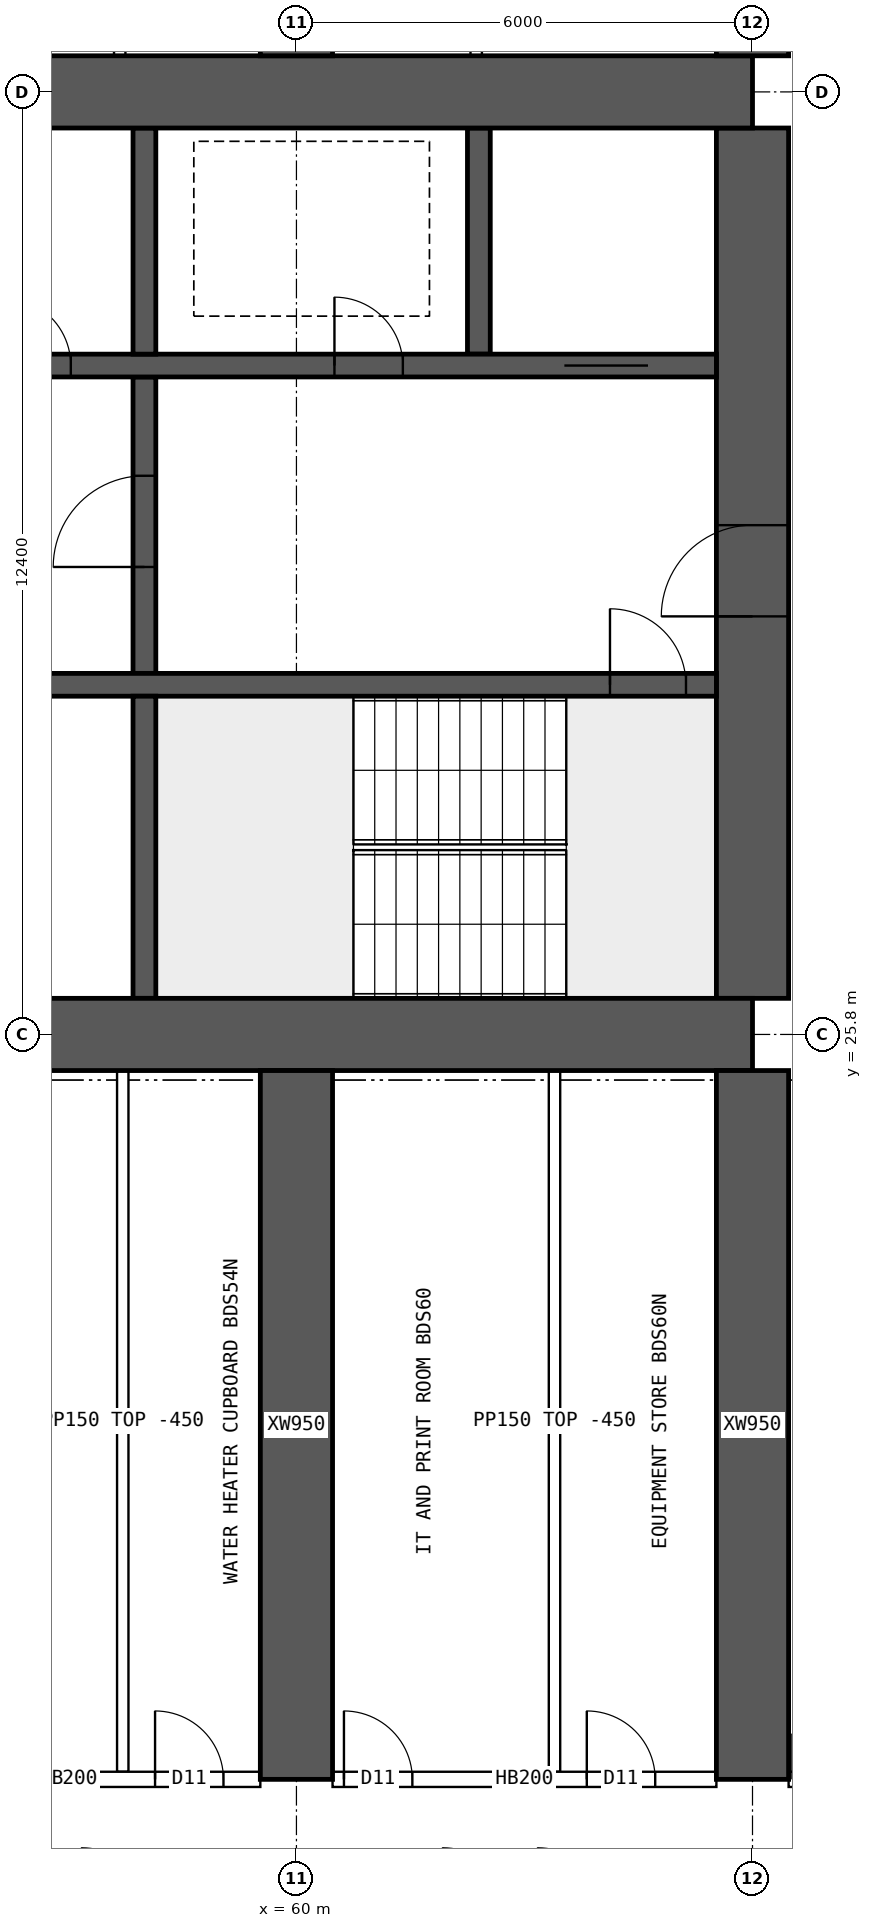
"""IFC4 building model, lengths in metres.
Left out: names, types, materials, properties, quantities, classifications, styles, units other than length and angle.
Written with IfcOpenShell. Run it as: python <this file> out.ifc"""

import sys

from ifc_helpers import new_model, si_unit, direction, frame, frame_2d, origin, place, context, subcontext, project, spatial, rectangle, extrude, element, fill, save


model = new_model("IFC4")
c1 = context("Model", 3, precision=1e-05, world=origin(), true_north=direction((0.0, 1.0)))
c2 = subcontext(c1, "Body", "Model", "MODEL_VIEW")
j1 = project(units=[si_unit("LENGTHUNIT", "METRE"), si_unit("PLANEANGLEUNIT", "RADIAN")], contexts=[c1])
p1 = place(None, origin())
s1 = spatial("IfcSite", under=j1, at=p1, CompositionType="ELEMENT")
p2 = place(p1, origin())
s2 = spatial("IfcBuilding", under=s1, at=p2, CompositionType="ELEMENT")
p3 = place(p2, frame((0.0, 0.0, 80.65)))
s3 = spatial("IfcBuildingStorey", under=s2, at=p3, CompositionType="ELEMENT", Elevation=80.65)
for number, where, z_axis, x_axis in (
    (1, (18.0, 25.8, 0.0), (0.0, 0.0, 1.0), (1.0, 0.0, 0.0)),
    (2, (18.0, 38.2, 0.0), (0.0, 0.0, 1.0), (1.0, 0.0, 0.0)),
):
    element("IfcWall", number, at=place(p3, frame(where, z_axis=z_axis, x_axis=x_axis)), inside=s3, PredefinedType="SHEAR", context=c2, shape_type="SweptSolid", body=[
        extrude(rectangle(XDim=48.0, YDim=0.95, at=frame_2d((24.0, 0.0))), origin(), (0.0, 0.0, 1.0), 3.75),
    ])
p4 = place(p3, frame((66.0, 26.275, 0.0), z_axis=(0.0, 0.0, 1.0), x_axis=(0.0, 1.0, 0.0)))
e3 = element("IfcWall", 3, at=p4, inside=s3, PredefinedType="SHEAR", context=c2, shape_type="SweptSolid", body=[
    extrude(rectangle(XDim=11.45, YDim=0.95, at=frame_2d((5.725, 0.0))), origin(), (0.0, 0.0, 1.0), 3.75),
])
p5 = place(p4, frame((5.025, 0.0, 0.0)))
e4 = element("IfcOpeningElement", 4, at=p5, cuts=e3, PredefinedType="OPENING", context=c2, shape_type="SweptSolid", body=[
    extrude(rectangle(XDim=1.2, YDim=2.1, at=frame_2d((0.6, 1.05))), frame((0.0, 0.485, 0.0), z_axis=(0.0, -1.0, 0.0), x_axis=(1.0, 0.0, 0.0)), (0.0, 0.0, 1.0), 0.97),
])
p6 = place(p3, frame((18.475, 30.4, 0.0), z_axis=(0.0, 0.0, 1.0), x_axis=(1.0, 0.0, 0.0)))
e5 = element("IfcWall", 5, at=p6, inside=s3, PredefinedType="SHEAR", context=c2, shape_type="SweptSolid", body=[
    extrude(rectangle(XDim=47.05, YDim=0.3, at=frame_2d((23.525, 0.0))), origin(), (0.0, 0.0, 1.0), 3.75),
])
p7 = place(p6, frame((0.4, 0.0, 0.0)))
e6 = element("IfcOpeningElement", 6, at=p7, cuts=e5, PredefinedType="OPENING", context=c2, shape_type="SweptSolid", body=[
    extrude(rectangle(XDim=1.0, YDim=2.1, at=frame_2d((0.5, 1.05))), frame((0.0, 0.16, 0.0), z_axis=(0.0, -1.0, 0.0), x_axis=(1.0, 0.0, 0.0)), (0.0, 0.0, 1.0), 0.32),
])
p8 = place(p6, frame((45.65, 0.0, 0.0)))
e7 = element("IfcOpeningElement", 7, at=p8, cuts=e5, PredefinedType="OPENING", context=c2, shape_type="SweptSolid", body=[
    extrude(rectangle(XDim=1.0, YDim=2.1, at=frame_2d((0.5, 1.05))), frame((0.0, 0.16, 0.0), z_axis=(0.0, -1.0, 0.0), x_axis=(1.0, 0.0, 0.0)), (0.0, 0.0, 1.0), 0.32),
])
p9 = place(p6, frame((8.275, 0.0, 0.0)))
e8 = element("IfcOpeningElement", 8, at=p9, cuts=e5, PredefinedType="OPENING", context=c2, shape_type="SweptSolid", body=[
    extrude(rectangle(XDim=1.1, YDim=2.1, at=frame_2d((0.55, 1.05))), frame((0.0, 0.16, 0.0), z_axis=(0.0, -1.0, 0.0), x_axis=(1.0, 0.0, 0.0)), (0.0, 0.0, 1.0), 0.32),
])
p10 = place(p6, frame((10.875, 0.0, 0.0)))
e9 = element("IfcOpeningElement", 9, at=p10, cuts=e5, PredefinedType="OPENING", context=c2, shape_type="SweptSolid", body=[
    extrude(rectangle(XDim=1.1, YDim=2.1, at=frame_2d((0.55, 1.05))), frame((0.0, 0.16, 0.0), z_axis=(0.0, -1.0, 0.0), x_axis=(1.0, 0.0, 0.0)), (0.0, 0.0, 1.0), 0.32),
])
p11 = place(p6, frame((13.475, 0.0, 0.0)))
e10 = element("IfcOpeningElement", 10, at=p11, cuts=e5, PredefinedType="OPENING", context=c2, shape_type="SweptSolid", body=[
    extrude(rectangle(XDim=1.1, YDim=2.1, at=frame_2d((0.55, 1.05))), frame((0.0, 0.16, 0.0), z_axis=(0.0, -1.0, 0.0), x_axis=(1.0, 0.0, 0.0)), (0.0, 0.0, 1.0), 0.32),
])
p12 = place(p6, frame((16.075, 0.0, 0.0)))
e11 = element("IfcOpeningElement", 11, at=p12, cuts=e5, PredefinedType="OPENING", context=c2, shape_type="SweptSolid", body=[
    extrude(rectangle(XDim=1.1, YDim=2.1, at=frame_2d((0.55, 1.05))), frame((0.0, 0.16, 0.0), z_axis=(0.0, -1.0, 0.0), x_axis=(1.0, 0.0, 0.0)), (0.0, 0.0, 1.0), 0.32),
])
p13 = place(p6, frame((30.142, 0.0, 0.0)))
e12 = element("IfcOpeningElement", 12, at=p13, cuts=e5, PredefinedType="OPENING", context=c2, shape_type="SweptSolid", body=[
    extrude(rectangle(XDim=1.1, YDim=2.1, at=frame_2d((0.55, 1.05))), frame((0.0, 0.16, 0.0), z_axis=(0.0, -1.0, 0.0), x_axis=(1.0, 0.0, 0.0)), (0.0, 0.0, 1.0), 0.32),
])
p14 = place(p6, frame((33.675, 0.0, 0.0)))
e13 = element("IfcOpeningElement", 13, at=p14, cuts=e5, PredefinedType="OPENING", context=c2, shape_type="SweptSolid", body=[
    extrude(rectangle(XDim=1.1, YDim=2.1, at=frame_2d((0.55, 1.05))), frame((0.0, 0.16, 0.0), z_axis=(0.0, -1.0, 0.0), x_axis=(1.0, 0.0, 0.0)), (0.0, 0.0, 1.0), 0.32),
])
p15 = place(p6, frame((37.208, 0.0, 0.0)))
e14 = element("IfcOpeningElement", 14, at=p15, cuts=e5, PredefinedType="OPENING", context=c2, shape_type="SweptSolid", body=[
    extrude(rectangle(XDim=1.1, YDim=2.1, at=frame_2d((0.55, 1.05))), frame((0.0, 0.16, 0.0), z_axis=(0.0, -1.0, 0.0), x_axis=(1.0, 0.0, 0.0)), (0.0, 0.0, 1.0), 0.32),
])
p16 = place(p3, frame((18.475, 34.6, 0.0), z_axis=(0.0, 0.0, 1.0), x_axis=(1.0, 0.0, 0.0)))
e15 = element("IfcWall", 15, at=p16, inside=s3, PredefinedType="SHEAR", context=c2, shape_type="SweptSolid", body=[
    extrude(rectangle(XDim=47.05, YDim=0.3, at=frame_2d((23.525, 0.0))), origin(), (0.0, 0.0, 1.0), 3.75),
])
p17 = place(p16, frame((0.9, 0.0, 0.0)))
e16 = element("IfcOpeningElement", 16, at=p17, cuts=e15, PredefinedType="OPENING", context=c2, shape_type="SweptSolid", body=[
    extrude(rectangle(XDim=1.1, YDim=2.1, at=frame_2d((0.55, 1.05))), frame((0.0, 0.16, 0.0), z_axis=(0.0, -1.0, 0.0), x_axis=(1.0, 0.0, 0.0)), (0.0, 0.0, 1.0), 0.32),
])
p18 = place(p16, frame((45.05, 0.0, 0.0)))
e17 = element("IfcOpeningElement", 17, at=p18, cuts=e15, PredefinedType="OPENING", context=c2, shape_type="SweptSolid", body=[
    extrude(rectangle(XDim=1.1, YDim=2.1, at=frame_2d((0.55, 1.05))), frame((0.0, 0.16, 0.0), z_axis=(0.0, -1.0, 0.0), x_axis=(1.0, 0.0, 0.0)), (0.0, 0.0, 1.0), 0.32),
])
p19 = place(p16, frame((4.125, 0.0, 0.0)))
e18 = element("IfcOpeningElement", 18, at=p19, cuts=e15, PredefinedType="OPENING", context=c2, shape_type="SweptSolid", body=[
    extrude(rectangle(XDim=0.9, YDim=2.1, at=frame_2d((0.45, 1.05))), frame((0.0, 0.16, 0.0), z_axis=(0.0, -1.0, 0.0), x_axis=(1.0, 0.0, 0.0)), (0.0, 0.0, 1.0), 0.32),
])
p20 = place(p16, frame((42.025, 0.0, 0.0)))
e19 = element("IfcOpeningElement", 19, at=p20, cuts=e15, PredefinedType="OPENING", context=c2, shape_type="SweptSolid", body=[
    extrude(rectangle(XDim=0.9, YDim=2.1, at=frame_2d((0.45, 1.05))), frame((0.0, 0.16, 0.0), z_axis=(0.0, -1.0, 0.0), x_axis=(1.0, 0.0, 0.0)), (0.0, 0.0, 1.0), 0.32),
])
p21 = place(p16, frame((8.9, 0.0, 0.0)))
e20 = element("IfcOpeningElement", 20, at=p21, cuts=e15, PredefinedType="OPENING", context=c2, shape_type="SweptSolid", body=[
    extrude(rectangle(XDim=0.9, YDim=2.1, at=frame_2d((0.45, 1.05))), frame((0.0, 0.16, 0.0), z_axis=(0.0, -1.0, 0.0), x_axis=(1.0, 0.0, 0.0)), (0.0, 0.0, 1.0), 0.32),
])
p22 = place(p16, frame((12.874, 0.0, 0.0)))
e21 = element("IfcOpeningElement", 21, at=p22, cuts=e15, PredefinedType="OPENING", context=c2, shape_type="SweptSolid", body=[
    extrude(rectangle(XDim=0.9, YDim=2.1, at=frame_2d((0.45, 1.05))), frame((0.0, 0.16, 0.0), z_axis=(0.0, -1.0, 0.0), x_axis=(1.0, 0.0, 0.0)), (0.0, 0.0, 1.0), 0.32),
])
p23 = place(p16, frame((16.521, 0.0, 0.0)))
e22 = element("IfcOpeningElement", 22, at=p23, cuts=e15, PredefinedType="OPENING", context=c2, shape_type="SweptSolid", body=[
    extrude(rectangle(XDim=0.9, YDim=2.1, at=frame_2d((0.45, 1.05))), frame((0.0, 0.16, 0.0), z_axis=(0.0, -1.0, 0.0), x_axis=(1.0, 0.0, 0.0)), (0.0, 0.0, 1.0), 0.32),
])
p24 = place(p16, frame((20.28, 0.0, 0.0)))
e23 = element("IfcOpeningElement", 23, at=p24, cuts=e15, PredefinedType="OPENING", context=c2, shape_type="SweptSolid", body=[
    extrude(rectangle(XDim=0.9, YDim=2.1, at=frame_2d((0.45, 1.05))), frame((0.0, 0.16, 0.0), z_axis=(0.0, -1.0, 0.0), x_axis=(1.0, 0.0, 0.0)), (0.0, 0.0, 1.0), 0.32),
])
p25 = place(p16, frame((24.686, 0.0, 0.0)))
e24 = element("IfcOpeningElement", 24, at=p25, cuts=e15, PredefinedType="OPENING", context=c2, shape_type="SweptSolid", body=[
    extrude(rectangle(XDim=0.9, YDim=2.1, at=frame_2d((0.45, 1.05))), frame((0.0, 0.16, 0.0), z_axis=(0.0, -1.0, 0.0), x_axis=(1.0, 0.0, 0.0)), (0.0, 0.0, 1.0), 0.32),
])
p26 = place(p16, frame((27.483, 0.0, 0.0)))
e25 = element("IfcOpeningElement", 25, at=p26, cuts=e15, PredefinedType="OPENING", context=c2, shape_type="SweptSolid", body=[
    extrude(rectangle(XDim=0.9, YDim=2.1, at=frame_2d((0.45, 1.05))), frame((0.0, 0.16, 0.0), z_axis=(0.0, -1.0, 0.0), x_axis=(1.0, 0.0, 0.0)), (0.0, 0.0, 1.0), 0.32),
])
p27 = place(p16, frame((29.45, 0.0, 0.0)))
e26 = element("IfcOpeningElement", 26, at=p27, cuts=e15, PredefinedType="OPENING", context=c2, shape_type="SweptSolid", body=[
    extrude(rectangle(XDim=0.9, YDim=2.1, at=frame_2d((0.45, 1.05))), frame((0.0, 0.16, 0.0), z_axis=(0.0, -1.0, 0.0), x_axis=(1.0, 0.0, 0.0)), (0.0, 0.0, 1.0), 0.32),
])
p28 = place(p16, frame((31.882, 0.0, 0.0)))
e27 = element("IfcOpeningElement", 27, at=p28, cuts=e15, PredefinedType="OPENING", context=c2, shape_type="SweptSolid", body=[
    extrude(rectangle(XDim=0.9, YDim=2.1, at=frame_2d((0.45, 1.05))), frame((0.0, 0.16, 0.0), z_axis=(0.0, -1.0, 0.0), x_axis=(1.0, 0.0, 0.0)), (0.0, 0.0, 1.0), 0.32),
])
p29 = place(p16, frame((34.617, 0.0, 0.0)))
e28 = element("IfcOpeningElement", 28, at=p29, cuts=e15, PredefinedType="OPENING", context=c2, shape_type="SweptSolid", body=[
    extrude(rectangle(XDim=0.9, YDim=2.1, at=frame_2d((0.45, 1.05))), frame((0.0, 0.16, 0.0), z_axis=(0.0, -1.0, 0.0), x_axis=(1.0, 0.0, 0.0)), (0.0, 0.0, 1.0), 0.32),
])
p30 = place(p16, frame((37.656, 0.0, 0.0)))
e29 = element("IfcOpeningElement", 29, at=p30, cuts=e15, PredefinedType="OPENING", context=c2, shape_type="SweptSolid", body=[
    extrude(rectangle(XDim=0.9, YDim=2.1, at=frame_2d((0.45, 1.05))), frame((0.0, 0.16, 0.0), z_axis=(0.0, -1.0, 0.0), x_axis=(1.0, 0.0, 0.0)), (0.0, 0.0, 1.0), 0.32),
])
p31 = place(p3, frame((58.0, 26.275, 0.0), z_axis=(0.0, 0.0, 1.0), x_axis=(0.0, 1.0, 0.0)))
e30 = element("IfcWall", 30, at=p31, inside=s3, PredefinedType="SHEAR", context=c2, shape_type="SweptSolid", body=[
    extrude(rectangle(XDim=3.975, YDim=0.3, at=frame_2d((1.988, 0.0))), origin(), (0.0, 0.0, 1.0), 3.75),
])
p32 = place(p3, frame((58.0, 30.55, 0.0), z_axis=(0.0, 0.0, 1.0), x_axis=(0.0, 1.0, 0.0)))
e31 = element("IfcWall", 31, at=p32, inside=s3, PredefinedType="SHEAR", context=c2, shape_type="SweptSolid", body=[
    extrude(rectangle(XDim=3.9, YDim=0.3, at=frame_2d((1.95, 0.0))), origin(), (0.0, 0.0, 1.0), 3.75),
])
p33 = place(p32, frame((1.4, 0.0, 0.0)))
e32 = element("IfcOpeningElement", 32, at=p33, cuts=e31, PredefinedType="OPENING", context=c2, shape_type="SweptSolid", body=[
    extrude(rectangle(XDim=1.2, YDim=2.1, at=frame_2d((0.6, 1.05))), frame((0.0, 0.16, 0.0), z_axis=(0.0, -1.0, 0.0), x_axis=(1.0, 0.0, 0.0)), (0.0, 0.0, 1.0), 0.32),
])
for number, where, z_axis, x_axis in (
    (33, (62.4, 34.75, 0.0), (0.0, 0.0, 1.0), (0.0, 1.0, 0.0)),
    (34, (58.0, 34.75, 0.0), (0.0, 0.0, 1.0), (0.0, 1.0, 0.0)),
):
    element("IfcWall", number, at=place(p3, frame(where, z_axis=z_axis, x_axis=x_axis)), inside=s3, PredefinedType="SHEAR", context=c2, shape_type="SweptSolid", body=[
        extrude(rectangle(XDim=2.975, YDim=0.3, at=frame_2d((1.488, 0.0))), origin(), (0.0, 0.0, 1.0), 3.75),
    ])
for number, where, z_axis, x_axis in (
    (35, (60.0, 16.0, 0.0), (0.0, 0.0, 1.0), (0.0, 1.0, 0.0)),
    (36, (60.0, 38.675, 0.0), (0.0, 0.0, 1.0), (0.0, 1.0, 0.0)),
    (37, (66.0, 16.0, 0.0), (0.0, 0.0, 1.0), (0.0, 1.0, 0.0)),
    (38, (66.0, 38.675, 0.0), (0.0, 0.0, 1.0), (0.0, 1.0, 0.0)),
):
    element("IfcWall", number, at=place(p3, frame(where, z_axis=z_axis, x_axis=x_axis)), inside=s3, PredefinedType="SHEAR", context=c2, shape_type="SweptSolid", body=[
        extrude(rectangle(XDim=9.325, YDim=0.95, at=frame_2d((4.663, 0.0))), origin(), (0.0, 0.0, 1.0), 3.75),
    ])
p34 = place(p3, frame((54.475, 16.0, 0.0), z_axis=(0.0, 0.0, 1.0), x_axis=(1.0, 0.0, 0.0)))
e39 = element("IfcWall", 39, at=p34, inside=s3, PredefinedType="SOLIDWALL", context=c2, shape_type="SweptSolid", body=[
    extrude(rectangle(XDim=5.05, YDim=0.2, at=frame_2d((2.525, 0.0))), origin(), (0.0, 0.0, 1.0), 3.3),
])
p35 = place(p34, frame((0.35, 0.0, 0.0)))
e40 = element("IfcOpeningElement", 40, at=p35, cuts=e39, PredefinedType="OPENING", context=c2, shape_type="SweptSolid", body=[
    extrude(rectangle(XDim=0.9, YDim=2.1, at=frame_2d((0.45, 1.05))), frame((0.0, 0.11, 0.0), z_axis=(0.0, -1.0, 0.0), x_axis=(1.0, 0.0, 0.0)), (0.0, 0.0, 1.0), 0.22),
])
p36 = place(p34, frame((3.665, 0.0, 0.0)))
e41 = element("IfcOpeningElement", 41, at=p36, cuts=e39, PredefinedType="OPENING", context=c2, shape_type="SweptSolid", body=[
    extrude(rectangle(XDim=0.9, YDim=2.1, at=frame_2d((0.45, 1.05))), frame((0.0, 0.11, 0.0), z_axis=(0.0, -1.0, 0.0), x_axis=(1.0, 0.0, 0.0)), (0.0, 0.0, 1.0), 0.22),
])
p37 = place(p3, frame((60.475, 16.0, 0.0), z_axis=(0.0, 0.0, 1.0), x_axis=(1.0, 0.0, 0.0)))
e42 = element("IfcWall", 42, at=p37, inside=s3, PredefinedType="SOLIDWALL", context=c2, shape_type="SweptSolid", body=[
    extrude(rectangle(XDim=5.05, YDim=0.2, at=frame_2d((2.525, 0.0))), origin(), (0.0, 0.0, 1.0), 3.3),
])
p38 = place(p37, frame((0.15, 0.0, 0.0)))
e43 = element("IfcOpeningElement", 43, at=p38, cuts=e42, PredefinedType="OPENING", context=c2, shape_type="SweptSolid", body=[
    extrude(rectangle(XDim=0.9, YDim=2.1, at=frame_2d((0.45, 1.05))), frame((0.0, 0.11, 0.0), z_axis=(0.0, -1.0, 0.0), x_axis=(1.0, 0.0, 0.0)), (0.0, 0.0, 1.0), 0.22),
])
p39 = place(p37, frame((3.345, 0.0, 0.0)))
e44 = element("IfcOpeningElement", 44, at=p39, cuts=e42, PredefinedType="OPENING", context=c2, shape_type="SweptSolid", body=[
    extrude(rectangle(XDim=0.9, YDim=2.1, at=frame_2d((0.45, 1.05))), frame((0.0, 0.11, 0.0), z_axis=(0.0, -1.0, 0.0), x_axis=(1.0, 0.0, 0.0)), (0.0, 0.0, 1.0), 0.22),
])
p40 = place(p3, frame((66.475, 16.0, 0.0), z_axis=(0.0, 0.0, 1.0), x_axis=(1.0, 0.0, 0.0)))
e45 = element("IfcWall", 45, at=p40, inside=s3, PredefinedType="SOLIDWALL", context=c2, shape_type="SweptSolid", body=[
    extrude(rectangle(XDim=1.925, YDim=0.2, at=frame_2d((0.962, 0.0))), origin(), (0.0, 0.0, 1.0), 3.3),
])
p41 = place(p40, frame((0.05, 0.0, 0.0)))
e46 = element("IfcOpeningElement", 46, at=p41, cuts=e45, PredefinedType="OPENING", context=c2, shape_type="SweptSolid", body=[
    extrude(rectangle(XDim=1.2, YDim=2.1, at=frame_2d((0.6, 1.05))), frame((0.0, 0.11, 0.0), z_axis=(0.0, -1.0, 0.0), x_axis=(1.0, 0.0, 0.0)), (0.0, 0.0, 1.0), 0.22),
])
for number, where, z_axis, x_axis in (
    (47, (57.715, 16.1, 0.0), (0.0, 0.0, 1.0), (0.0, 1.0, 0.0)),
    (48, (63.395, 16.1, 0.0), (0.0, 0.0, 1.0), (0.0, 1.0, 0.0)),
    (49, (57.675, 38.675, 0.0), (0.0, 0.0, 1.0), (0.0, 1.0, 0.0)),
    (50, (62.365, 38.675, 0.0), (0.0, 0.0, 1.0), (0.0, 1.0, 0.0)),
):
    element("IfcWall", number, at=place(p3, frame(where, z_axis=z_axis, x_axis=x_axis)), inside=s3, PredefinedType="PARTITIONING", context=c2, shape_type="SweptSolid", body=[
        extrude(rectangle(XDim=9.225, YDim=0.15, at=frame_2d((4.612, 0.0))), origin(), (0.0, 0.0, 1.0), 3.3),
    ])
p42 = place(p5, origin())
e51 = element("IfcDoor", 51, at=p42, inside=s3, OperationType="SINGLE_SWING_LEFT", PredefinedType="DOOR", context=c2, shape_type="SweptSolid", body=[
    extrude(rectangle(XDim=1.2, YDim=2.1, at=frame_2d((0.6, 1.05))), frame((0.0, 0.025, 0.0), z_axis=(0.0, -1.0, 0.0), x_axis=(1.0, 0.0, 0.0)), (0.0, 0.0, 1.0), 0.05),
])
fill(e4, e51)
p43 = place(p8, origin())
e52 = element("IfcDoor", 52, at=p43, inside=s3, OperationType="SINGLE_SWING_LEFT", PredefinedType="DOOR", context=c2, shape_type="SweptSolid", body=[
    extrude(rectangle(XDim=1.0, YDim=2.1, at=frame_2d((0.5, 1.05))), frame((0.0, 0.025, 0.0), z_axis=(0.0, -1.0, 0.0), x_axis=(1.0, 0.0, 0.0)), (0.0, 0.0, 1.0), 0.05),
])
fill(e7, e52)
p44 = place(p18, origin())
e53 = element("IfcDoor", 53, at=p44, inside=s3, OperationType="DOUBLE_DOOR_SLIDING", PredefinedType="DOOR", context=c2, shape_type="SweptSolid", body=[
    extrude(rectangle(XDim=1.1, YDim=2.1, at=frame_2d((0.55, 1.05))), frame((0.0, 0.025, 0.0), z_axis=(0.0, -1.0, 0.0), x_axis=(1.0, 0.0, 0.0)), (0.0, 0.0, 1.0), 0.05),
])
fill(e17, e53)
p45 = place(p20, origin())
e54 = element("IfcDoor", 54, at=p45, inside=s3, OperationType="SINGLE_SWING_LEFT", PredefinedType="DOOR", context=c2, shape_type="SweptSolid", body=[
    extrude(rectangle(XDim=0.9, YDim=2.1, at=frame_2d((0.45, 1.05))), frame((0.0, 0.025, 0.0), z_axis=(0.0, -1.0, 0.0), x_axis=(1.0, 0.0, 0.0)), (0.0, 0.0, 1.0), 0.05),
])
fill(e19, e54)
p46 = place(p33, origin())
e55 = element("IfcDoor", 55, at=p46, inside=s3, OperationType="SINGLE_SWING_LEFT", PredefinedType="DOOR", context=c2, shape_type="SweptSolid", body=[
    extrude(rectangle(XDim=1.2, YDim=2.1, at=frame_2d((0.6, 1.05))), frame((0.0, 0.025, 0.0), z_axis=(0.0, -1.0, 0.0), x_axis=(1.0, 0.0, 0.0)), (0.0, 0.0, 1.0), 0.05),
])
fill(e32, e55)
p47 = place(p30, origin())
e56 = element("IfcDoor", 56, at=p47, inside=s3, OperationType="SINGLE_SWING_LEFT", PredefinedType="DOOR", context=c2, shape_type="SweptSolid", body=[
    extrude(rectangle(XDim=0.9, YDim=2.1, at=frame_2d((0.45, 1.05))), frame((0.0, 0.025, 0.0), z_axis=(0.0, -1.0, 0.0), x_axis=(1.0, 0.0, 0.0)), (0.0, 0.0, 1.0), 0.05),
])
fill(e29, e56)
p48 = place(p36, origin())
e57 = element("IfcDoor", 57, at=p48, inside=s3, OperationType="SINGLE_SWING_LEFT", PredefinedType="DOOR", context=c2, shape_type="SweptSolid", body=[
    extrude(rectangle(XDim=0.9, YDim=2.1, at=frame_2d((0.45, 1.05))), frame((0.0, 0.025, 0.0), z_axis=(0.0, -1.0, 0.0), x_axis=(1.0, 0.0, 0.0)), (0.0, 0.0, 1.0), 0.05),
])
fill(e41, e57)
p49 = place(p38, origin())
e58 = element("IfcDoor", 58, at=p49, inside=s3, OperationType="SINGLE_SWING_LEFT", PredefinedType="DOOR", context=c2, shape_type="SweptSolid", body=[
    extrude(rectangle(XDim=0.9, YDim=2.1, at=frame_2d((0.45, 1.05))), frame((0.0, 0.025, 0.0), z_axis=(0.0, -1.0, 0.0), x_axis=(1.0, 0.0, 0.0)), (0.0, 0.0, 1.0), 0.05),
])
fill(e43, e58)
p50 = place(p39, origin())
e59 = element("IfcDoor", 59, at=p50, inside=s3, OperationType="SINGLE_SWING_LEFT", PredefinedType="DOOR", context=c2, shape_type="SweptSolid", body=[
    extrude(rectangle(XDim=0.9, YDim=2.1, at=frame_2d((0.45, 1.05))), frame((0.0, 0.025, 0.0), z_axis=(0.0, -1.0, 0.0), x_axis=(1.0, 0.0, 0.0)), (0.0, 0.0, 1.0), 0.05),
])
fill(e44, e59)
save(model, sys.argv[1])
